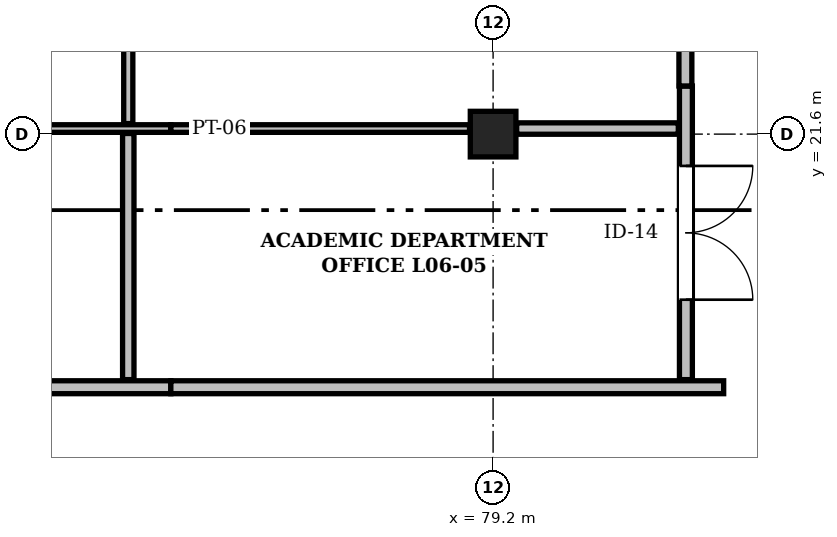
"""IFC4 building model, lengths in metres.
Left out: names, types, materials, properties, quantities, classifications, styles, units other than length and angle.
Written with IfcOpenShell. Run it as: python <this file> out.ifc"""

import sys

from ifc_helpers import new_model, si_unit, direction, frame, frame_2d, origin, origin_2d, place, context, subcontext, project, spatial, rectangle, extrude, element, fill, save


model = new_model("IFC4")
c1 = context("Model", 3, precision=1e-05, world=origin(), true_north=direction((0.0, 1.0)))
c2 = subcontext(c1, "Body", "Model", "MODEL_VIEW")
j1 = project(units=[si_unit("LENGTHUNIT", "METRE"), si_unit("PLANEANGLEUNIT", "RADIAN")], contexts=[c1])
p1 = place(None, origin())
s1 = spatial("IfcSite", under=j1, at=p1, CompositionType="ELEMENT")
p2 = place(p1, origin())
s2 = spatial("IfcBuilding", under=s1, at=p2, CompositionType="ELEMENT")
p3 = place(p2, frame((0.0, 0.0, 27.9)))
s3 = spatial("IfcBuildingStorey", under=s2, at=p3, CompositionType="ELEMENT", Elevation=27.9)
p4 = place(p3, frame((79.2, 21.6, 0.0), z_axis=(0.0, 0.0, 1.0), x_axis=(1.0, 0.0, 0.0)))
e1 = element("IfcColumn", 1, at=p4, inside=s3, PredefinedType="COLUMN", context=c2, shape_type="SweptSolid", body=[
    extrude(rectangle(XDim=0.6, YDim=0.6, at=origin_2d()), origin(), (0.0, 0.0, 1.0), 4.5),
])
p5 = place(p3, frame((60.43, 18.27, 0.0), z_axis=(0.0, 0.0, 1.0), x_axis=(1.0, 0.0, 0.0)))
e2 = element("IfcWall", 2, at=p5, inside=s3, PredefinedType="PARTITIONING", context=c2, shape_type="SweptSolid", body=[
    extrude(rectangle(XDim=14.53, YDim=0.17, at=frame_2d((7.265, 0.0))), origin(), (0.0, 0.0, 1.0), 4.16),
])
p6 = place(p3, frame((74.96, 18.27, 0.0), z_axis=(0.0, 0.0, 1.0), x_axis=(1.0, 0.0, 0.0)))
e3 = element("IfcWall", 3, at=p6, inside=s3, PredefinedType="PARTITIONING", context=c2, shape_type="SweptSolid", body=[
    extrude(rectangle(XDim=7.274, YDim=0.17, at=frame_2d((3.637, 0.0))), origin(), (0.0, 0.0, 1.0), 4.16),
])
p7 = place(p3, frame((81.737, 18.37, 0.0), z_axis=(0.0, 0.0, 1.0), x_axis=(0.0, 1.0, 0.0)))
e4 = element("IfcWall", 4, at=p7, inside=s3, PredefinedType="PARTITIONING", context=c2, shape_type="SweptSolid", body=[
    extrude(rectangle(XDim=3.863, YDim=0.17, at=frame_2d((1.932, 0.0))), origin(), (0.0, 0.0, 1.0), 4.16),
])
p8 = place(p7, frame((1.052, 0.0, 0.0)))
e5 = element("IfcOpeningElement", 5, at=p8, cuts=e4, PredefinedType="OPENING", context=c2, shape_type="SweptSolid", body=[
    extrude(rectangle(XDim=1.76, YDim=2.3, at=frame_2d((0.88, 1.15))), frame((0.0, 0.097, 0.0), z_axis=(0.0, -1.0, 0.0), x_axis=(1.0, 0.0, 0.0)), (0.0, 0.0, 1.0), 0.194),
])
p9 = place(p3, frame((81.73, 22.233, 0.0), z_axis=(0.0, 0.0, 1.0), x_axis=(0.0, 1.0, 0.0)))
e6 = element("IfcWall", 6, at=p9, inside=s3, PredefinedType="PARTITIONING", context=c2, shape_type="SweptSolid", body=[
    extrude(rectangle(XDim=17.853, YDim=0.17, at=frame_2d((8.927, 0.0))), origin(), (0.0, 0.0, 1.0), 4.16),
])
p10 = place(p9, frame((7.967, 0.0, 0.0)))
e7 = element("IfcOpeningElement", 7, at=p10, cuts=e6, PredefinedType="OPENING", context=c2, shape_type="SweptSolid", body=[
    extrude(rectangle(XDim=1.92, YDim=2.32, at=frame_2d((0.96, 1.16))), frame((0.0, 0.097, 0.0), z_axis=(0.0, -1.0, 0.0), x_axis=(1.0, 0.0, 0.0)), (0.0, 0.0, 1.0), 0.194),
])
p11 = place(p3, frame((72.31, 21.673, 0.0), z_axis=(0.0, 0.0, 1.0), x_axis=(1.0, 0.0, 0.0)))
e8 = element("IfcWall", 8, at=p11, inside=s3, PredefinedType="PARTITIONING", context=c2, shape_type="SweptSolid", body=[
    extrude(rectangle(XDim=2.65, YDim=0.1, at=frame_2d((1.325, 0.0))), origin(), (0.0, 0.0, 1.0), 3.8),
])
p12 = place(p3, frame((74.4, 18.37, 0.0), z_axis=(0.0, 0.0, 1.0), x_axis=(0.0, 1.0, 0.0)))
e9 = element("IfcWall", 9, at=p12, inside=s3, PredefinedType="PARTITIONING", context=c2, shape_type="SweptSolid", body=[
    extrude(rectangle(XDim=3.238, YDim=0.15, at=frame_2d((1.619, 0.0))), origin(), (0.0, 0.0, 1.0), 4.16),
])
p13 = place(p3, frame((74.4, 21.738, 0.0), z_axis=(0.0, 0.0, 1.0), x_axis=(0.0, 1.0, 0.0)))
e10 = element("IfcWall", 10, at=p13, inside=s3, PredefinedType="PARTITIONING", context=c2, shape_type="SweptSolid", body=[
    extrude(rectangle(XDim=6.92, YDim=0.12, at=frame_2d((3.46, 0.0))), origin(), (0.0, 0.0, 1.0), 4.16),
])
p14 = place(p3, frame((74.96, 21.673, 0.0), z_axis=(0.0, 0.0, 1.0), x_axis=(1.0, 0.0, 0.0)))
e11 = element("IfcWall", 11, at=p14, inside=s3, PredefinedType="PARTITIONING", context=c2, shape_type="SweptSolid", body=[
    extrude(rectangle(XDim=3.93, YDim=0.1, at=frame_2d((1.965, 0.0))), origin(), (0.0, 0.0, 1.0), 3.8),
])
p15 = place(p3, frame((79.51, 21.673, 0.0), z_axis=(0.0, 0.0, 1.0), x_axis=(1.0, 0.0, 0.0)))
e12 = element("IfcWall", 12, at=p15, inside=s3, PredefinedType="PARTITIONING", context=c2, shape_type="SweptSolid", body=[
    extrude(rectangle(XDim=2.127, YDim=0.15, at=frame_2d((1.063, 0.0))), origin(), (0.0, 0.0, 1.0), 3.8),
])
p16 = place(p8, frame((1.76, 0.0, 0.0), z_axis=(0.0, 0.0, 1.0), x_axis=(-1.0, 0.0, 0.0)))
e13 = element("IfcDoor", 13, at=p16, inside=s3, OperationType="DOUBLE_DOOR_SINGLE_SWING", PredefinedType="DOOR", context=c2, shape_type="SweptSolid", body=[
    extrude(rectangle(XDim=1.76, YDim=2.3, at=frame_2d((0.88, 1.15))), frame((0.0, 0.025, 0.0), z_axis=(0.0, -1.0, 0.0), x_axis=(1.0, 0.0, 0.0)), (0.0, 0.0, 1.0), 0.05),
])
fill(e5, e13)
save(model, sys.argv[1])
